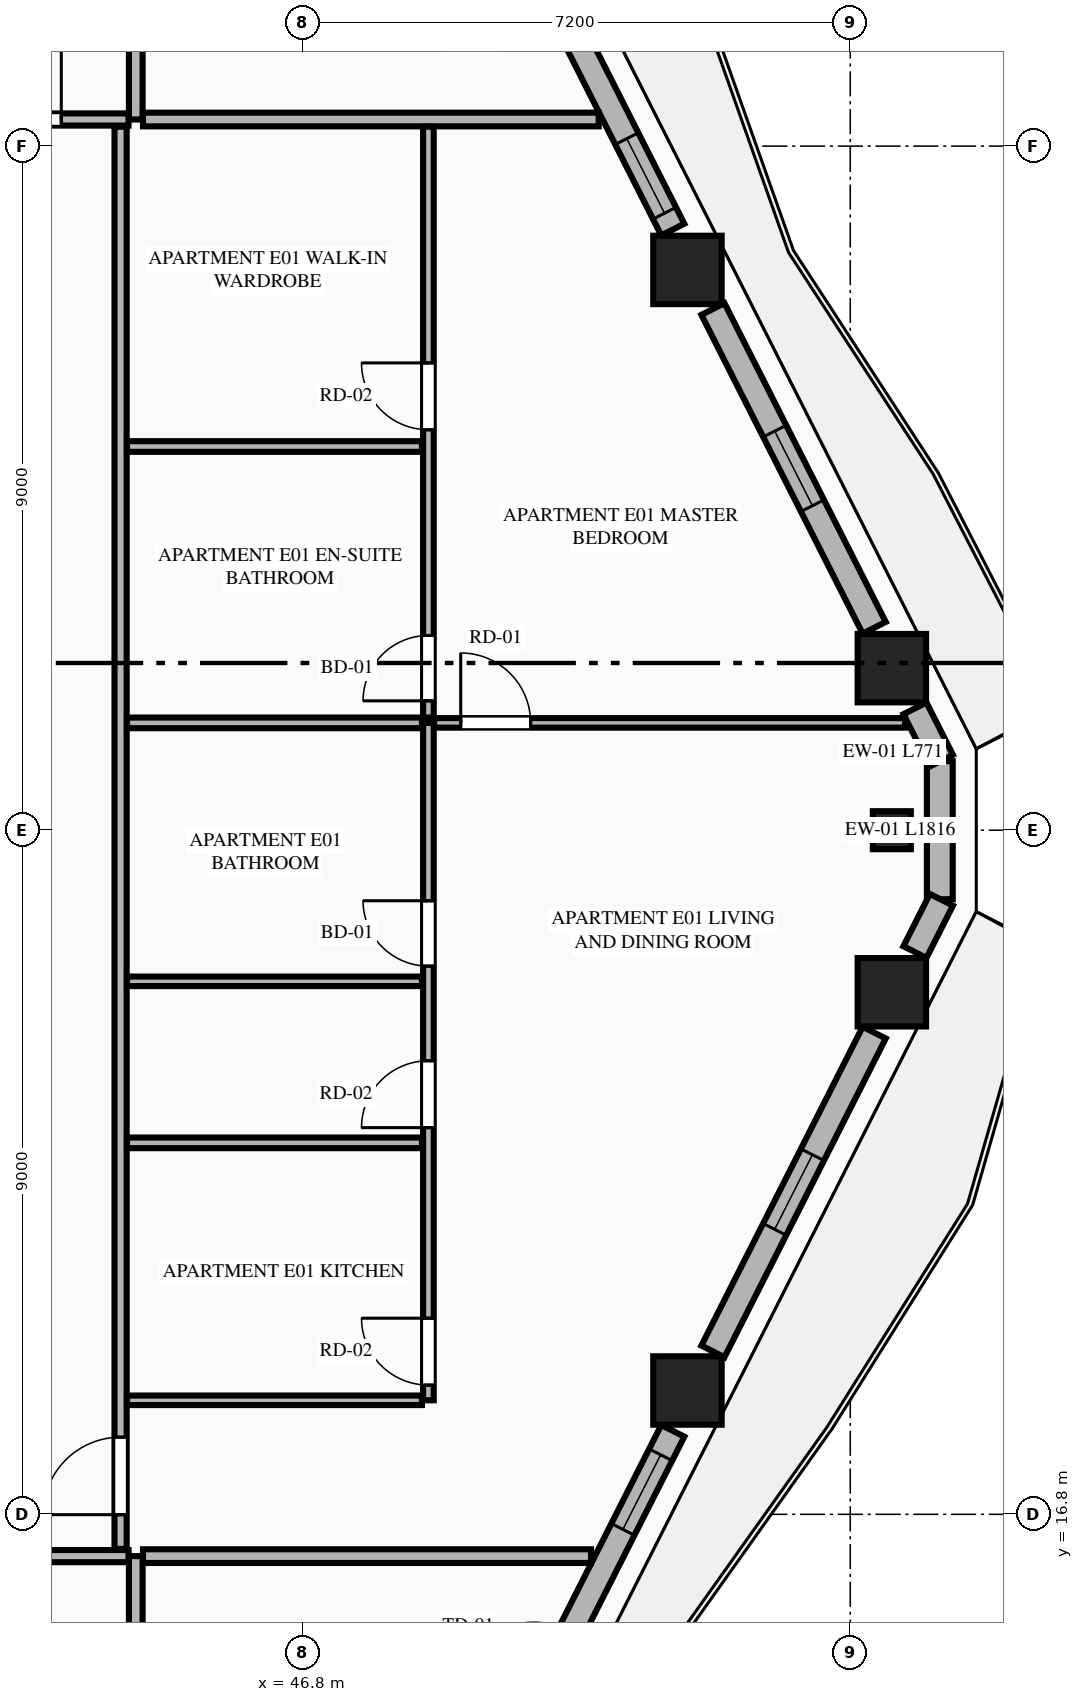
"""IFC4 building model, lengths in metres.
Left out: names, types, materials, properties, quantities, classifications, styles, units other than length and angle.
Written with IfcOpenShell. Run it as: python <this file> out.ifc"""

import sys

from ifc_helpers import new_model, si_unit, direction, frame, frame_2d, origin, origin_2d, place, context, subcontext, project, spatial, rectangle, extrude, element, fill, save


model = new_model("IFC4")
c1 = context("Model", 3, precision=1e-05, world=origin(), true_north=direction((0.0, 1.0)))
c2 = subcontext(c1, "Body", "Model", "MODEL_VIEW")
j1 = project(units=[si_unit("LENGTHUNIT", "METRE"), si_unit("PLANEANGLEUNIT", "RADIAN")], contexts=[c1])
p1 = place(None, origin())
s1 = spatial("IfcSite", under=j1, at=p1, CompositionType="ELEMENT")
p2 = place(p1, origin())
s2 = spatial("IfcBuilding", under=s1, at=p2, CompositionType="ELEMENT")
p3 = place(p2, frame((0.0, 0.0, 193.2)))
s3 = spatial("IfcBuildingStorey", under=s2, at=p3, CompositionType="ELEMENT", Elevation=193.2)
for number, where, z_axis, x_axis in (
    (1, (51.858, 18.429, 0.0), (0.0, 0.0, 1.0), (1.0, 0.0, 0.0)),
    (2, (54.547, 23.668, 0.0), (0.0, 0.0, 1.0), (1.0, 0.0, 0.0)),
    (3, (54.547, 27.932, 0.0), (0.0, 0.0, 1.0), (1.0, 0.0, 0.0)),
    (4, (51.858, 33.171, 0.0), (0.0, 0.0, 1.0), (1.0, 0.0, 0.0)),
):
    element("IfcColumn", number, at=place(p3, frame(where, z_axis=z_axis, x_axis=x_axis)), inside=s3, PredefinedType="COLUMN", context=c2, shape_type="SweptSolid", body=[
        extrude(rectangle(XDim=0.9, YDim=0.9, at=origin_2d()), origin(), (0.0, 0.0, 1.0), 3.55),
    ])
p4 = place(p3, frame((54.547, 25.8, 0.0), z_axis=(0.0, 0.0, 1.0), x_axis=(0.0, 1.0, 0.0)))
e5 = element("IfcColumn", 5, at=p4, inside=s3, PredefinedType="PILASTER", context=c2, shape_type="SweptSolid", body=[
    extrude(rectangle(XDim=0.5, YDim=0.35, at=origin_2d()), origin(), (0.0, 0.0, 1.0), 3.55),
])
p5 = place(p3, frame((55.178, 24.892, 0.0), z_axis=(0.0, 0.0, 1.0), x_axis=(0.0, 1.0, 0.0)))
e6 = element("IfcWall", 6, at=p5, inside=s3, PredefinedType="STANDARD", context=c2, shape_type="SweptSolid", body=[
    extrude(rectangle(XDim=1.816, YDim=0.34, at=frame_2d((0.908, 0.0))), origin(), (0.0, 0.0, 1.0), 3.35),
])
p6 = place(p3, frame((49.448, 13.517, 0.0), z_axis=(0.0, 0.0, 1.0), x_axis=(0.451544279509, 0.892248711763, 0.0)))
e7 = element("IfcWall", 7, at=p6, inside=s3, PredefinedType="STANDARD", context=c2, shape_type="SweptSolid", body=[
    extrude(rectangle(XDim=4.91, YDim=0.34, at=frame_2d((2.455, 0.0))), origin(), (0.0, 0.0, 1.0), 2.883),
])
p7 = place(p6, frame((0.856, 0.0, 0.0)))
e8 = element("IfcOpeningElement", 8, at=p7, cuts=e7, PredefinedType="OPENING", context=c2, shape_type="SweptSolid", body=[
    extrude(rectangle(XDim=1.1, YDim=2.25, at=frame_2d((0.55, 1.125))), frame((0.0, 0.18, 0.0), z_axis=(0.0, -1.0, 0.0), x_axis=(1.0, 0.0, 0.0)), (0.0, 0.0, 1.0), 0.36),
])
p8 = place(p6, frame((3.457, 0.0, 0.75)))
e9 = element("IfcOpeningElement", 9, at=p8, cuts=e7, PredefinedType="OPENING", context=c2, shape_type="SweptSolid", body=[
    extrude(rectangle(XDim=1.1, YDim=1.983, at=frame_2d((0.55, 0.991))), frame((0.0, 0.18, 0.0), z_axis=(0.0, -1.0, 0.0), x_axis=(1.0, 0.0, 0.0)), (0.0, 0.0, 1.0), 0.36),
])
p9 = place(p3, frame((52.193, 18.943, 0.0), z_axis=(0.0, 0.0, 1.0), x_axis=(0.451447222193, 0.892297823361, 0.0)))
e10 = element("IfcWall", 10, at=p9, inside=s3, PredefinedType="STANDARD", context=c2, shape_type="SweptSolid", body=[
    extrude(rectangle(XDim=4.7, YDim=0.34, at=frame_2d((2.35, 0.0))), origin(), (0.0, 0.0, 1.0), 2.883),
])
p10 = place(p9, frame((1.8, 0.0, 0.75)))
e11 = element("IfcOpeningElement", 11, at=p10, cuts=e10, PredefinedType="OPENING", context=c2, shape_type="SweptSolid", body=[
    extrude(rectangle(XDim=1.1, YDim=1.983, at=frame_2d((0.55, 0.991))), frame((0.0, 0.18, 0.0), z_axis=(0.0, -1.0, 0.0), x_axis=(1.0, 0.0, 0.0)), (0.0, 0.0, 1.0), 0.36),
])
for number, where, z_axis, x_axis in (
    (12, (54.851, 24.197, 0.0), (0.0, 0.0, 1.0), (0.451, 0.892, 0.0)),
    (13, (55.199, 26.715, 0.0), (0.0, 0.0, 1.0), (-0.451, 0.892, 0.0)),
):
    element("IfcWall", number, at=place(p3, frame(where, z_axis=z_axis, x_axis=x_axis)), inside=s3, PredefinedType="STANDARD", context=c2, shape_type="SweptSolid", body=[
        extrude(rectangle(XDim=0.771, YDim=0.34, at=frame_2d((0.385, 0.0))), origin(), (0.0, 0.0, 1.0), 3.35),
    ])
p11 = place(p3, frame((54.315, 28.463, 0.0), z_axis=(0.0, 0.0, 1.0), x_axis=(-0.451426298588, 0.892308409096, 0.0)))
e14 = element("IfcWall", 14, at=p11, inside=s3, PredefinedType="STANDARD", context=c2, shape_type="SweptSolid", body=[
    extrude(rectangle(XDim=4.7, YDim=0.34, at=frame_2d((2.35, 0.0))), origin(), (0.0, 0.0, 1.0), 2.883),
])
p12 = place(p11, frame((1.8, 0.0, 0.75)))
e15 = element("IfcOpeningElement", 15, at=p12, cuts=e14, PredefinedType="OPENING", context=c2, shape_type="SweptSolid", body=[
    extrude(rectangle(XDim=1.1, YDim=1.983, at=frame_2d((0.55, 0.991))), frame((0.0, 0.18, 0.0), z_axis=(0.0, -1.0, 0.0), x_axis=(1.0, 0.0, 0.0)), (0.0, 0.0, 1.0), 0.36),
])
p13 = place(p3, frame((51.665, 33.702, 0.0), z_axis=(0.0, 0.0, 1.0), x_axis=(-0.451524246964, 0.89225884944, 0.0)))
e16 = element("IfcWall", 16, at=p13, inside=s3, PredefinedType="STANDARD", context=c2, shape_type="SweptSolid", body=[
    extrude(rectangle(XDim=4.91, YDim=0.34, at=frame_2d((2.455, 0.0))), origin(), (0.0, 0.0, 1.0), 2.883),
])
p14 = place(p13, frame((2.842, 0.0, 0.0)))
e17 = element("IfcOpeningElement", 17, at=p14, cuts=e16, PredefinedType="OPENING", context=c2, shape_type="SweptSolid", body=[
    extrude(rectangle(XDim=1.1, YDim=2.25, at=frame_2d((0.55, 1.125))), frame((0.0, 0.18, 0.0), z_axis=(0.0, -1.0, 0.0), x_axis=(1.0, 0.0, 0.0)), (0.0, 0.0, 1.0), 0.36),
])
p15 = place(p13, frame((0.241, 0.0, 0.75)))
e18 = element("IfcOpeningElement", 18, at=p15, cuts=e16, PredefinedType="OPENING", context=c2, shape_type="SweptSolid", body=[
    extrude(rectangle(XDim=1.1, YDim=1.983, at=frame_2d((0.55, 0.991))), frame((0.0, 0.18, 0.0), z_axis=(0.0, -1.0, 0.0), x_axis=(1.0, 0.0, 0.0)), (0.0, 0.0, 1.0), 0.36),
])
p16 = place(p3, frame((44.6, 5.968, 0.0), z_axis=(0.0, 0.0, 1.0), x_axis=(0.0, 1.0, 0.0)))
e19 = element("IfcWall", 19, at=p16, inside=s3, PredefinedType="PARTITIONING", context=c2, shape_type="SweptSolid", body=[
    extrude(rectangle(XDim=10.282, YDim=0.18, at=frame_2d((5.141, 0.0))), origin(), (0.0, 0.0, 1.0), 3.35),
])
p17 = place(p3, frame((20.295, 16.25, 0.0), z_axis=(0.0, 0.0, 1.0), x_axis=(1.0, 0.0, 0.0)))
e20 = element("IfcWall", 20, at=p17, inside=s3, PredefinedType="PARTITIONING", context=c2, shape_type="SweptSolid", body=[
    extrude(rectangle(XDim=24.21, YDim=0.16, at=frame_2d((12.105, 0.0))), origin(), (0.0, 0.0, 1.0), 3.35),
])
p18 = place(p17, frame((22.005, 0.0, 0.0)))
e21 = element("IfcOpeningElement", 21, at=p18, cuts=e20, PredefinedType="OPENING", context=c2, shape_type="SweptSolid", body=[
    extrude(rectangle(XDim=1.02, YDim=2.25, at=frame_2d((0.51, 1.125))), frame((0.0, 0.09, 0.0), z_axis=(0.0, -1.0, 0.0), x_axis=(1.0, 0.0, 0.0)), (0.0, 0.0, 1.0), 0.18),
])
p19 = place(p3, frame((44.6, 35.15, 0.0), z_axis=(0.0, 0.0, 1.0), x_axis=(0.0, 1.0, 0.0)))
e22 = element("IfcWall", 22, at=p19, inside=s3, PredefinedType="PARTITIONING", context=c2, shape_type="SweptSolid", body=[
    extrude(rectangle(XDim=10.482, YDim=0.18, at=frame_2d((5.241, 0.0))), origin(), (0.0, 0.0, 1.0), 3.35),
])
p20 = place(p3, frame((28.952, 35.15, 0.0), z_axis=(0.0, 0.0, 1.0), x_axis=(1.0, 0.0, 0.0)))
e23 = element("IfcWall", 23, at=p20, inside=s3, PredefinedType="PARTITIONING", context=c2, shape_type="SweptSolid", body=[
    extrude(rectangle(XDim=15.553, YDim=0.16, at=frame_2d((7.776, 0.0))), origin(), (0.0, 0.0, 1.0), 3.35),
])
p21 = place(p20, frame((13.648, 0.0, 0.0)))
e24 = element("IfcOpeningElement", 24, at=p21, cuts=e23, PredefinedType="OPENING", context=c2, shape_type="SweptSolid", body=[
    extrude(rectangle(XDim=1.02, YDim=2.25, at=frame_2d((0.51, 1.125))), frame((0.0, 0.09, 0.0), z_axis=(0.0, -1.0, 0.0), x_axis=(1.0, 0.0, 0.0)), (0.0, 0.0, 1.0), 0.18),
])
p22 = place(p3, frame((44.695, 16.25, 0.0), z_axis=(0.0, 0.0, 1.0), x_axis=(1.0, 0.0, 0.0)))
e25 = element("IfcWall", 25, at=p22, inside=s3, PredefinedType="PARTITIONING", context=c2, shape_type="SweptSolid", body=[
    extrude(rectangle(XDim=5.894, YDim=0.18, at=frame_2d((2.947, 0.0))), origin(), (0.0, 0.0, 1.0), 3.35),
])
p23 = place(p3, frame((44.695, 35.15, 0.0), z_axis=(0.0, 0.0, 1.0), x_axis=(1.0, 0.0, 0.0)))
e26 = element("IfcWall", 26, at=p23, inside=s3, PredefinedType="PARTITIONING", context=c2, shape_type="SweptSolid", body=[
    extrude(rectangle(XDim=5.995, YDim=0.18, at=frame_2d((2.998, 0.0))), origin(), (0.0, 0.0, 1.0), 3.35),
])
p24 = place(p3, frame((44.4, 16.345, 0.0), z_axis=(0.0, 0.0, 1.0), x_axis=(0.0, 1.0, 0.0)))
e27 = element("IfcWall", 27, at=p24, inside=s3, PredefinedType="PARTITIONING", context=c2, shape_type="SweptSolid", body=[
    extrude(rectangle(XDim=18.71, YDim=0.16, at=frame_2d((9.355, 0.0))), origin(), (0.0, 0.0, 1.0), 3.35),
])
p25 = place(p24, frame((0.45, 0.0, 0.0)))
e28 = element("IfcOpeningElement", 28, at=p25, cuts=e27, PredefinedType="OPENING", context=c2, shape_type="SweptSolid", body=[
    extrude(rectangle(XDim=1.02, YDim=2.25, at=frame_2d((0.51, 1.125))), frame((0.0, 0.09, 0.0), z_axis=(0.0, -1.0, 0.0), x_axis=(1.0, 0.0, 0.0)), (0.0, 0.0, 1.0), 0.18),
])
p26 = place(p3, frame((44.485, 18.3, 0.0), z_axis=(0.0, 0.0, 1.0), x_axis=(1.0, 0.0, 0.0)))
e29 = element("IfcWall", 29, at=p26, inside=s3, PredefinedType="PARTITIONING", context=c2, shape_type="SweptSolid", body=[
    extrude(rectangle(XDim=3.88, YDim=0.125, at=frame_2d((1.94, 0.0))), origin(), (0.0, 0.0, 1.0), 2.807),
])
p27 = place(p3, frame((48.45, 18.3, 0.0), z_axis=(0.0, 0.0, 1.0), x_axis=(0.0, 1.0, 0.0)))
e30 = element("IfcWall", 30, at=p27, inside=s3, PredefinedType="PLUMBINGWALL", context=c2, shape_type="SweptSolid", body=[
    extrude(rectangle(XDim=8.912, YDim=0.14, at=frame_2d((4.456, 0.0))), origin(), (0.0, 0.0, 1.0), 3.35),
])
p28 = place(p27, frame((0.2, 0.0, 0.0)))
e31 = element("IfcOpeningElement", 31, at=p28, cuts=e30, PredefinedType="OPENING", context=c2, shape_type="SweptSolid", body=[
    extrude(rectangle(XDim=0.88, YDim=2.15, at=frame_2d((0.44, 1.075))), frame((0.0, 0.08, 0.0), z_axis=(0.0, -1.0, 0.0), x_axis=(1.0, 0.0, 0.0)), (0.0, 0.0, 1.0), 0.16),
])
p29 = place(p27, frame((3.587, 0.0, 0.0)))
e32 = element("IfcOpeningElement", 32, at=p29, cuts=e30, PredefinedType="OPENING", context=c2, shape_type="SweptSolid", body=[
    extrude(rectangle(XDim=0.88, YDim=2.15, at=frame_2d((0.44, 1.075))), frame((0.0, 0.08, 0.0), z_axis=(0.0, -1.0, 0.0), x_axis=(1.0, 0.0, 0.0)), (0.0, 0.0, 1.0), 0.16),
])
p30 = place(p27, frame((5.712, 0.0, 0.0)))
e33 = element("IfcOpeningElement", 33, at=p30, cuts=e30, PredefinedType="OPENING", context=c2, shape_type="SweptSolid", body=[
    extrude(rectangle(XDim=0.86, YDim=2.1, at=frame_2d((0.43, 1.05))), frame((0.0, 0.08, 0.0), z_axis=(0.0, -1.0, 0.0), x_axis=(1.0, 0.0, 0.0)), (0.0, 0.0, 1.0), 0.16),
])
p31 = place(p3, frame((48.45, 27.282, 0.0), z_axis=(0.0, 0.0, 1.0), x_axis=(0.0, 1.0, 0.0)))
e34 = element("IfcWall", 34, at=p31, inside=s3, PredefinedType="PLUMBINGWALL", context=c2, shape_type="SweptSolid", body=[
    extrude(rectangle(XDim=7.773, YDim=0.14, at=frame_2d((3.886, 0.0))), origin(), (0.0, 0.0, 1.0), 3.35),
])
p32 = place(p31, frame((0.22, 0.0, 0.0)))
e35 = element("IfcOpeningElement", 35, at=p32, cuts=e34, PredefinedType="OPENING", context=c2, shape_type="SweptSolid", body=[
    extrude(rectangle(XDim=0.86, YDim=2.1, at=frame_2d((0.43, 1.05))), frame((0.0, 0.08, 0.0), z_axis=(0.0, -1.0, 0.0), x_axis=(1.0, 0.0, 0.0)), (0.0, 0.0, 1.0), 0.16),
])
p33 = place(p31, frame((3.786, 0.0, 0.0)))
e36 = element("IfcOpeningElement", 36, at=p33, cuts=e34, PredefinedType="OPENING", context=c2, shape_type="SweptSolid", body=[
    extrude(rectangle(XDim=0.88, YDim=2.15, at=frame_2d((0.44, 1.075))), frame((0.0, 0.08, 0.0), z_axis=(0.0, -1.0, 0.0), x_axis=(1.0, 0.0, 0.0)), (0.0, 0.0, 1.0), 0.16),
])
p34 = place(p3, frame((44.485, 27.212, 0.0), z_axis=(0.0, 0.0, 1.0), x_axis=(1.0, 0.0, 0.0)))
e37 = element("IfcWall", 37, at=p34, inside=s3, PredefinedType="PLUMBINGWALL", context=c2, shape_type="SweptSolid", body=[
    extrude(rectangle(XDim=3.88, YDim=0.14, at=frame_2d((1.94, 0.0))), origin(), (0.0, 0.0, 1.0), 3.35),
])
p35 = place(p3, frame((48.525, 27.212, 0.0), z_axis=(0.0, 0.0, 1.0), x_axis=(1.0, 0.0, 0.0)))
e38 = element("IfcWall", 38, at=p35, inside=s3, PredefinedType="PARTITIONING", context=c2, shape_type="SweptSolid", body=[
    extrude(rectangle(XDim=6.196, YDim=0.125, at=frame_2d((3.098, 0.0))), origin(), (0.0, 0.0, 1.0), 3.35),
])
p36 = place(p35, frame((0.35, 0.0, 0.0)))
e39 = element("IfcOpeningElement", 39, at=p36, cuts=e38, PredefinedType="OPENING", context=c2, shape_type="SweptSolid", body=[
    extrude(rectangle(XDim=0.92, YDim=2.15, at=frame_2d((0.46, 1.075))), frame((0.0, 0.073, 0.0), z_axis=(0.0, -1.0, 0.0), x_axis=(1.0, 0.0, 0.0)), (0.0, 0.0, 1.0), 0.145),
])
p37 = place(p3, frame((44.485, 21.687, 0.0), z_axis=(0.0, 0.0, 1.0), x_axis=(1.0, 0.0, 0.0)))
e40 = element("IfcWall", 40, at=p37, inside=s3, PredefinedType="PLUMBINGWALL", context=c2, shape_type="SweptSolid", body=[
    extrude(rectangle(XDim=3.88, YDim=0.14, at=frame_2d((1.94, 0.0))), origin(), (0.0, 0.0, 1.0), 3.35),
])
p38 = place(p3, frame((44.485, 23.812, 0.0), z_axis=(0.0, 0.0, 1.0), x_axis=(1.0, 0.0, 0.0)))
e41 = element("IfcWall", 41, at=p38, inside=s3, PredefinedType="PARTITIONING", context=c2, shape_type="SweptSolid", body=[
    extrude(rectangle(XDim=3.88, YDim=0.125, at=frame_2d((1.94, 0.0))), origin(), (0.0, 0.0, 1.0), 3.35),
])
p39 = place(p3, frame((44.485, 30.848, 0.0), z_axis=(0.0, 0.0, 1.0), x_axis=(1.0, 0.0, 0.0)))
e42 = element("IfcWall", 42, at=p39, inside=s3, PredefinedType="PLUMBINGWALL", context=c2, shape_type="SweptSolid", body=[
    extrude(rectangle(XDim=3.88, YDim=0.14, at=frame_2d((1.94, 0.0))), origin(), (0.0, 0.0, 1.0), 3.35),
])
p40 = place(p10, origin())
e43 = element("IfcWindow", 43, at=p40, inside=s3, PartitioningType="SINGLE_PANEL", PredefinedType="WINDOW", context=c2, shape_type="SweptSolid", body=[
    extrude(rectangle(XDim=1.1, YDim=1.983, at=frame_2d((0.55, 0.991))), frame((0.0, 0.03, 0.0), z_axis=(0.0, -1.0, 0.0), x_axis=(1.0, 0.0, 0.0)), (0.0, 0.0, 1.0), 0.06),
])
fill(e11, e43)
p41 = place(p12, origin())
e44 = element("IfcWindow", 44, at=p41, inside=s3, PartitioningType="SINGLE_PANEL", PredefinedType="WINDOW", context=c2, shape_type="SweptSolid", body=[
    extrude(rectangle(XDim=1.1, YDim=1.983, at=frame_2d((0.55, 0.991))), frame((0.0, 0.03, 0.0), z_axis=(0.0, -1.0, 0.0), x_axis=(1.0, 0.0, 0.0)), (0.0, 0.0, 1.0), 0.06),
])
fill(e15, e44)
p42 = place(p21, origin())
e45 = element("IfcDoor", 45, at=p42, inside=s3, OperationType="SINGLE_SWING_RIGHT", PredefinedType="DOOR", context=c2, shape_type="SweptSolid", body=[
    extrude(rectangle(XDim=1.02, YDim=2.25, at=frame_2d((0.51, 1.125))), frame((0.0, 0.025, 0.0), z_axis=(0.0, -1.0, 0.0), x_axis=(1.0, 0.0, 0.0)), (0.0, 0.0, 1.0), 0.05),
])
fill(e24, e45)
p43 = place(p28, origin())
e46 = element("IfcDoor", 46, at=p43, inside=s3, OperationType="SINGLE_SWING_RIGHT", PredefinedType="DOOR", context=c2, shape_type="SweptSolid", body=[
    extrude(rectangle(XDim=0.88, YDim=2.15, at=frame_2d((0.44, 1.075))), frame((0.0, 0.025, 0.0), z_axis=(0.0, -1.0, 0.0), x_axis=(1.0, 0.0, 0.0)), (0.0, 0.0, 1.0), 0.05),
])
fill(e31, e46)
p44 = place(p29, origin())
e47 = element("IfcDoor", 47, at=p44, inside=s3, OperationType="SINGLE_SWING_LEFT", PredefinedType="DOOR", context=c2, shape_type="SweptSolid", body=[
    extrude(rectangle(XDim=0.88, YDim=2.15, at=frame_2d((0.44, 1.075))), frame((0.0, 0.025, 0.0), z_axis=(0.0, -1.0, 0.0), x_axis=(1.0, 0.0, 0.0)), (0.0, 0.0, 1.0), 0.05),
])
fill(e32, e47)
p45 = place(p30, origin())
e48 = element("IfcDoor", 48, at=p45, inside=s3, OperationType="SINGLE_SWING_RIGHT", PredefinedType="DOOR", context=c2, shape_type="SweptSolid", body=[
    extrude(rectangle(XDim=0.86, YDim=2.1, at=frame_2d((0.43, 1.05))), frame((0.0, 0.025, 0.0), z_axis=(0.0, -1.0, 0.0), x_axis=(1.0, 0.0, 0.0)), (0.0, 0.0, 1.0), 0.05),
])
fill(e33, e48)
p46 = place(p32, origin())
e49 = element("IfcDoor", 49, at=p46, inside=s3, OperationType="SINGLE_SWING_LEFT", PredefinedType="DOOR", context=c2, shape_type="SweptSolid", body=[
    extrude(rectangle(XDim=0.86, YDim=2.1, at=frame_2d((0.43, 1.05))), frame((0.0, 0.025, 0.0), z_axis=(0.0, -1.0, 0.0), x_axis=(1.0, 0.0, 0.0)), (0.0, 0.0, 1.0), 0.05),
])
fill(e35, e49)
p47 = place(p33, origin())
e50 = element("IfcDoor", 50, at=p47, inside=s3, OperationType="SINGLE_SWING_RIGHT", PredefinedType="DOOR", context=c2, shape_type="SweptSolid", body=[
    extrude(rectangle(XDim=0.88, YDim=2.15, at=frame_2d((0.44, 1.075))), frame((0.0, 0.025, 0.0), z_axis=(0.0, -1.0, 0.0), x_axis=(1.0, 0.0, 0.0)), (0.0, 0.0, 1.0), 0.05),
])
fill(e36, e50)
p48 = place(p25, origin())
e51 = element("IfcDoor", 51, at=p48, inside=s3, OperationType="SINGLE_SWING_LEFT", PredefinedType="DOOR", context=c2, shape_type="SweptSolid", body=[
    extrude(rectangle(XDim=1.02, YDim=2.25, at=frame_2d((0.51, 1.125))), frame((0.0, 0.025, 0.0), z_axis=(0.0, -1.0, 0.0), x_axis=(1.0, 0.0, 0.0)), (0.0, 0.0, 1.0), 0.05),
])
fill(e28, e51)
p49 = place(p36, origin())
e52 = element("IfcDoor", 52, at=p49, inside=s3, OperationType="SINGLE_SWING_LEFT", PredefinedType="DOOR", context=c2, shape_type="SweptSolid", body=[
    extrude(rectangle(XDim=0.92, YDim=2.15, at=frame_2d((0.46, 1.075))), frame((0.0, 0.025, 0.0), z_axis=(0.0, -1.0, 0.0), x_axis=(1.0, 0.0, 0.0)), (0.0, 0.0, 1.0), 0.05),
])
fill(e39, e52)
p50 = place(p8, origin())
e53 = element("IfcWindow", 53, at=p50, inside=s3, PartitioningType="SINGLE_PANEL", PredefinedType="WINDOW", context=c2, shape_type="SweptSolid", body=[
    extrude(rectangle(XDim=1.1, YDim=1.983, at=frame_2d((0.55, 0.991))), frame((0.0, 0.03, 0.0), z_axis=(0.0, -1.0, 0.0), x_axis=(1.0, 0.0, 0.0)), (0.0, 0.0, 1.0), 0.06),
])
fill(e9, e53)
p51 = place(p15, origin())
e54 = element("IfcWindow", 54, at=p51, inside=s3, PartitioningType="SINGLE_PANEL", PredefinedType="WINDOW", context=c2, shape_type="SweptSolid", body=[
    extrude(rectangle(XDim=1.1, YDim=1.983, at=frame_2d((0.55, 0.991))), frame((0.0, 0.03, 0.0), z_axis=(0.0, -1.0, 0.0), x_axis=(1.0, 0.0, 0.0)), (0.0, 0.0, 1.0), 0.06),
])
fill(e18, e54)
save(model, sys.argv[1])
